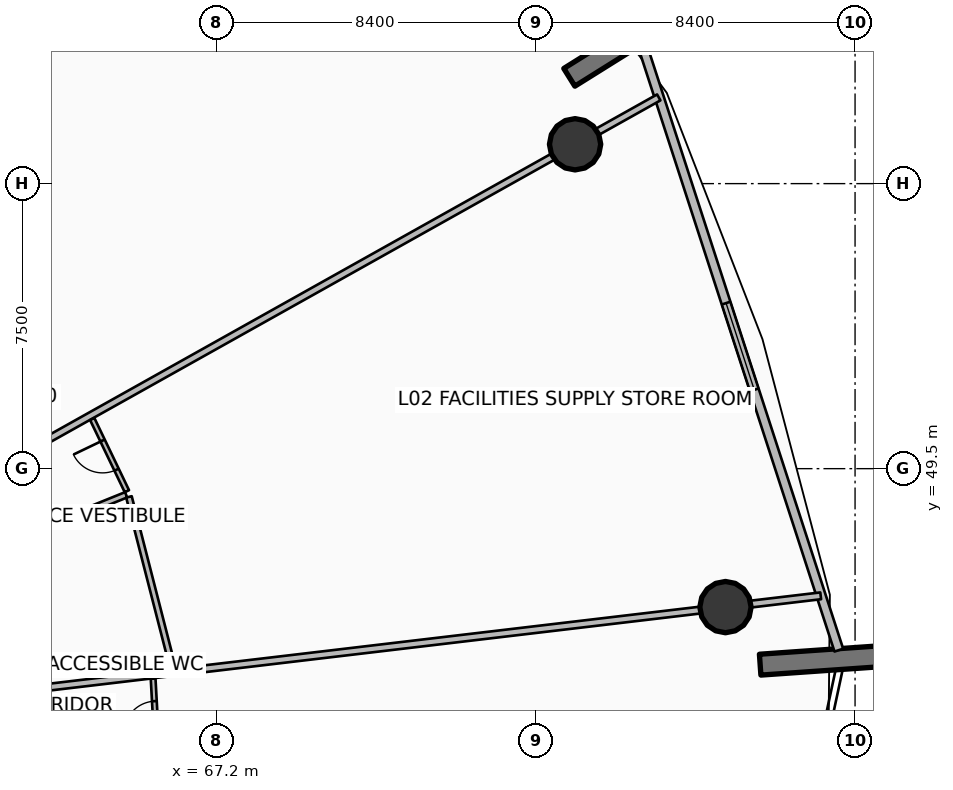
"""IFC4 building model, lengths in metres.
Left out: names, types, materials, properties, quantities, classifications, styles, units other than length and angle.
Written with IfcOpenShell. Run it as: python <this file> out.ifc"""

import sys

from ifc_helpers import new_model, si_unit, direction, frame, frame_2d, origin, origin_2d, place, context, subcontext, project, spatial, rectangle, circle, extrude, element, fill, save


model = new_model("IFC4")
c1 = context("Model", 3, precision=1e-05, world=origin(), true_north=direction((0.0, 1.0)))
c2 = subcontext(c1, "Body", "Model", "MODEL_VIEW")
j1 = project(units=[si_unit("LENGTHUNIT", "METRE"), si_unit("PLANEANGLEUNIT", "RADIAN")], contexts=[c1])
p1 = place(None, origin())
s1 = spatial("IfcSite", under=j1, at=p1, CompositionType="ELEMENT")
p2 = place(p1, origin())
s2 = spatial("IfcBuilding", under=s1, at=p2, CompositionType="ELEMENT")
p3 = place(p2, frame((0.0, 0.0, 12.0)))
s3 = spatial("IfcBuildingStorey", under=s2, at=p3, CompositionType="ELEMENT", Elevation=12.0)
for number, where, z_axis, x_axis in (
    (1, (76.481, 59.797, 0.0), (0.0, 0.0, 1.0), (0.848, 0.53, 0.0)),
    (2, (81.503, 44.343, 0.0), (0.0, 0.0, 1.0), (0.998, 0.07, 0.0)),
):
    element("IfcWall", number, at=place(p3, frame(where, z_axis=z_axis, x_axis=x_axis)), inside=s3, PredefinedType="SOLIDWALL", context=c2, shape_type="SweptSolid", body=[
        extrude(rectangle(XDim=3.5, YDim=0.55, at=frame_2d((1.75, 0.0))), origin(), (0.0, 0.0, 1.0), 4.8),
    ])
for number, where, z_axis, x_axis in (
    (3, (76.633, 58.035, 0.0), (0.0, 0.0, 1.0), (1.0, 0.0, 0.0)),
    (4, (80.59, 45.857, 0.0), (0.0, 0.0, 1.0), (1.0, 0.0, 0.0)),
):
    element("IfcColumn", number, at=place(p3, frame(where, z_axis=z_axis, x_axis=x_axis)), inside=s3, PredefinedType="COLUMN", context=c2, shape_type="SweptSolid", body=[
        extrude(circle(Radius=0.675, at=origin_2d()), origin(), (0.0, 0.0, 1.0), 4.48),
    ])
p4 = place(p3, frame((83.573, 44.725, 0.0), z_axis=(0.0, 0.0, 1.0), x_axis=(-0.309022005354, 0.951054888115, 0.0)))
e5 = element("IfcWall", 5, at=p4, inside=s3, PredefinedType="SOLIDWALL", context=c2, shape_type="SweptSolid", body=[
    extrude(rectangle(XDim=16.803, YDim=0.24, at=frame_2d((8.401, 0.0))), origin(), (0.0, 0.0, 1.0), 3.43),
])
p5 = place(p4, frame((7.201, 0.0, 0.85)))
e6 = element("IfcOpeningElement", 6, at=p5, cuts=e5, PredefinedType="OPENING", context=c2, shape_type="SweptSolid", body=[
    extrude(rectangle(XDim=2.4, YDim=2.1, at=frame_2d((1.2, 1.05))), frame((0.0, 0.13, 0.0), z_axis=(0.0, -1.0, 0.0), x_axis=(1.0, 0.0, 0.0)), (0.0, 0.0, 1.0), 0.26),
])
p6 = place(p3, frame((62.096, 49.894, 0.0), z_axis=(0.0, 0.0, 1.0), x_axis=(0.872490608205, 0.488630881744, 0.0)))
e7 = element("IfcWall", 7, at=p6, inside=s3, PredefinedType="PARTITIONING", context=c2, shape_type="SweptSolid", body=[
    extrude(rectangle(XDim=19.185, YDim=0.18, at=frame_2d((9.592, 0.0))), origin(), (0.0, 0.0, 1.0), 3.693),
])
p7 = place(p3, frame((65.641, 41.941, 0.0), z_axis=(0.0, 0.0, 1.0), x_axis=(-0.054918793983, 0.998490824228, 0.0)))
e8 = element("IfcWall", 8, at=p7, inside=s3, PredefinedType="PARTITIONING", context=c2, shape_type="SweptSolid", body=[
    extrude(rectangle(XDim=2.036, YDim=0.125, at=frame_2d((1.018, 0.0))), origin(), (0.0, 0.0, 1.0), 3.693),
])
p8 = place(p7, frame((0.593, 0.0, 0.0)))
e9 = element("IfcOpeningElement", 9, at=p8, cuts=e8, PredefinedType="OPENING", context=c2, shape_type="SweptSolid", body=[
    extrude(rectangle(XDim=0.85, YDim=2.06, at=frame_2d((0.425, 1.03))), frame((0.0, 0.073, 0.0), z_axis=(0.0, -1.0, 0.0), x_axis=(1.0, 0.0, 0.0)), (0.0, 0.0, 1.0), 0.145),
])
p9 = place(p3, frame((62.109, 43.67, 0.0), z_axis=(0.0, 0.0, 1.0), x_axis=(0.993068665713, 0.117535633659, 0.0)))
e10 = element("IfcWall", 10, at=p9, inside=s3, PredefinedType="PARTITIONING", context=c2, shape_type="SweptSolid", body=[
    extrude(rectangle(XDim=21.133, YDim=0.18, at=frame_2d((10.566, 0.0))), origin(), (0.0, 0.0, 1.0), 3.693),
])
p10 = place(p3, frame((62.074, 47.701, 0.0), z_axis=(0.0, 0.0, 1.0), x_axis=(0.926852538468, 0.375425587747, 0.0)))
e11 = element("IfcWall", 11, at=p10, inside=s3, PredefinedType="PARTITIONING", context=c2, shape_type="SweptSolid", body=[
    extrude(rectangle(XDim=2.96, YDim=0.15, at=frame_2d((1.48, 0.0))), origin(), (0.0, 0.0, 1.0), 3.92),
])
p11 = place(p3, frame((66.054, 44.237, 0.0), z_axis=(0.0, 0.0, 1.0), x_axis=(-0.248710144761, 0.968577959636, 0.0)))
e12 = element("IfcWall", 12, at=p11, inside=s3, PredefinedType="PARTITIONING", context=c2, shape_type="SweptSolid", body=[
    extrude(rectangle(XDim=4.667, YDim=0.15, at=frame_2d((2.333, 0.0))), origin(), (0.0, 0.0, 1.0), 3.693),
])
p12 = place(p3, frame((64.839, 48.906, 0.0), z_axis=(0.0, 0.0, 1.0), x_axis=(-0.432923235959, 0.901430791446, 0.0)))
e13 = element("IfcWall", 13, at=p12, inside=s3, PredefinedType="PARTITIONING", context=c2, shape_type="SweptSolid", body=[
    extrude(rectangle(XDim=2.106, YDim=0.125, at=frame_2d((1.053, 0.0))), origin(), (0.0, 0.0, 1.0), 3.693),
])
p13 = place(p12, frame((0.628, 0.0, 0.0)))
e14 = element("IfcOpeningElement", 14, at=p13, cuts=e13, PredefinedType="OPENING", context=c2, shape_type="SweptSolid", body=[
    extrude(rectangle(XDim=0.85, YDim=2.06, at=frame_2d((0.425, 1.03))), frame((0.0, 0.073, 0.0), z_axis=(0.0, -1.0, 0.0), x_axis=(1.0, 0.0, 0.0)), (0.0, 0.0, 1.0), 0.145),
])
p14 = place(p5, origin())
e15 = element("IfcWindow", 15, at=p14, inside=s3, PartitioningType="SINGLE_PANEL", PredefinedType="WINDOW", context=c2, shape_type="SweptSolid", body=[
    extrude(rectangle(XDim=2.4, YDim=2.1, at=frame_2d((1.2, 1.05))), frame((0.0, 0.03, 0.0), z_axis=(0.0, -1.0, 0.0), x_axis=(1.0, 0.0, 0.0)), (0.0, 0.0, 1.0), 0.06),
])
fill(e6, e15)
p15 = place(p8, origin())
e16 = element("IfcDoor", 16, at=p15, inside=s3, OperationType="SINGLE_SWING_LEFT", PredefinedType="DOOR", context=c2, shape_type="SweptSolid", body=[
    extrude(rectangle(XDim=0.85, YDim=2.06, at=frame_2d((0.425, 1.03))), frame((0.0, 0.025, 0.0), z_axis=(0.0, -1.0, 0.0), x_axis=(1.0, 0.0, 0.0)), (0.0, 0.0, 1.0), 0.05),
])
fill(e9, e16)
p16 = place(p13, origin())
e17 = element("IfcDoor", 17, at=p16, inside=s3, OperationType="SINGLE_SWING_RIGHT", PredefinedType="DOOR", context=c2, shape_type="SweptSolid", body=[
    extrude(rectangle(XDim=0.85, YDim=2.06, at=frame_2d((0.425, 1.03))), frame((0.0, 0.025, 0.0), z_axis=(0.0, -1.0, 0.0), x_axis=(1.0, 0.0, 0.0)), (0.0, 0.0, 1.0), 0.05),
])
fill(e14, e17)
save(model, sys.argv[1])
